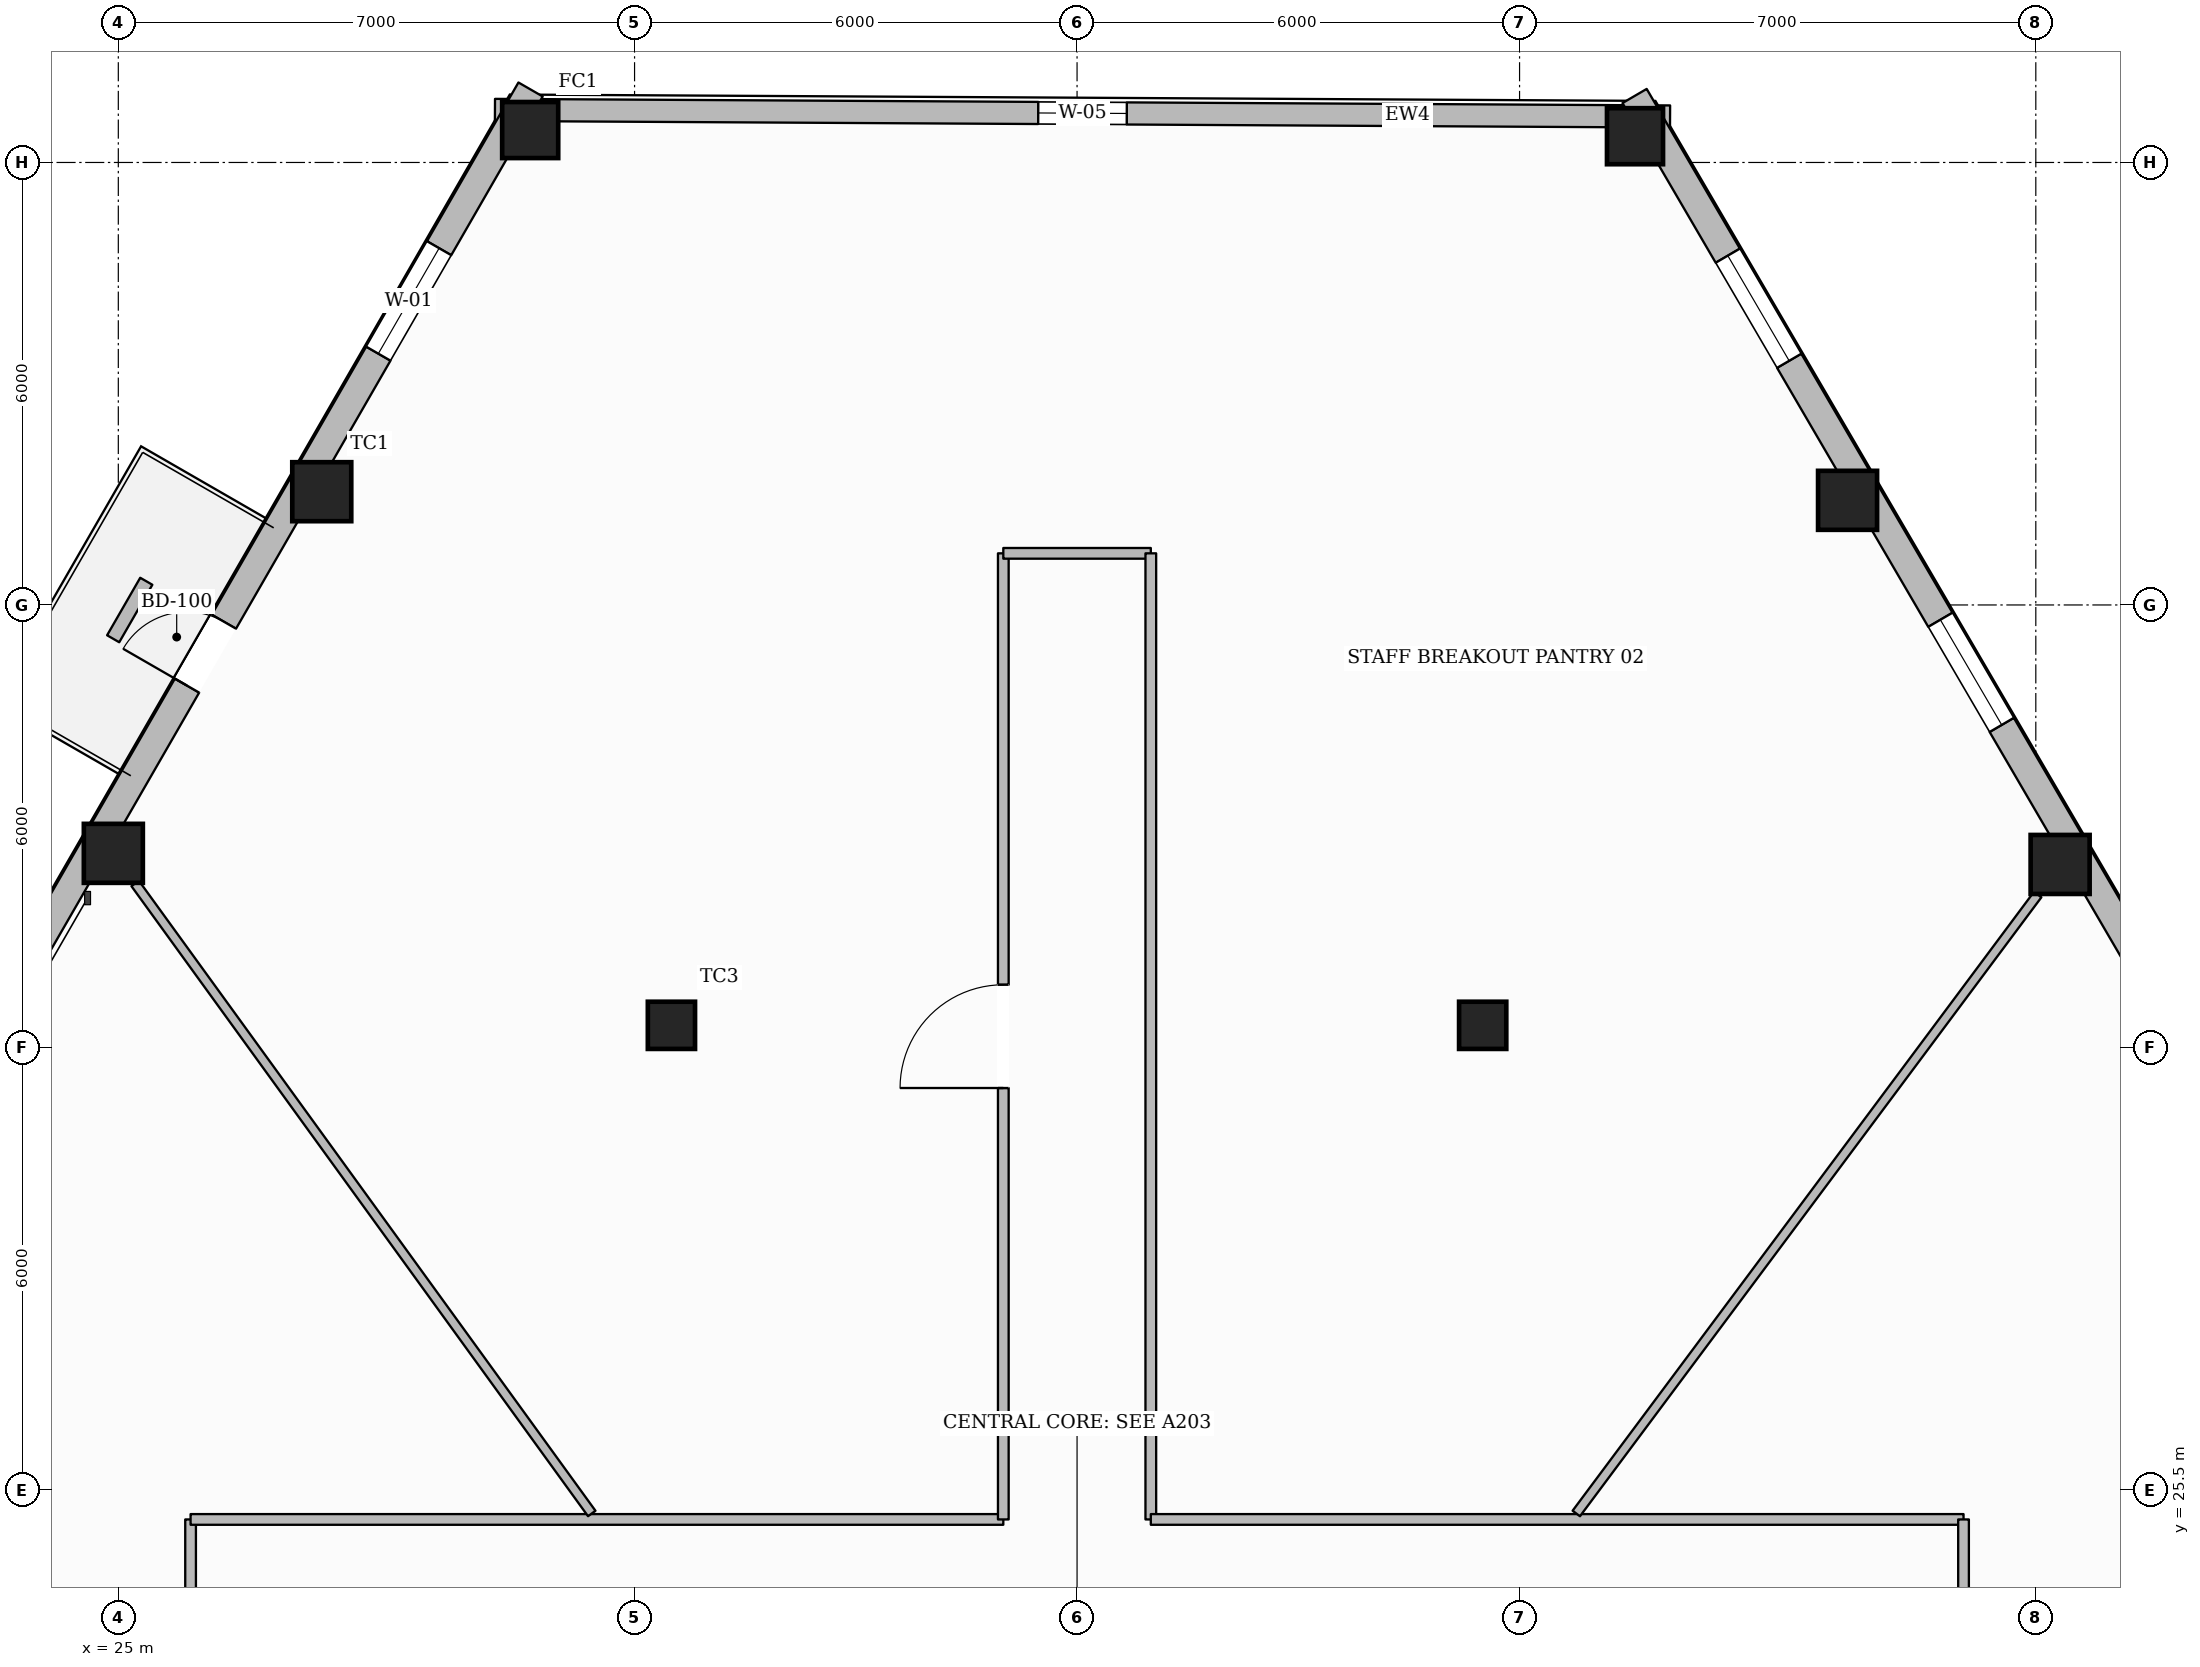
"""IFC4 building model, lengths in metres.
Left out: names, types, materials, properties, quantities, classifications, styles, units other than length and angle.
Written with IfcOpenShell. Run it as: python <this file> out.ifc"""

import sys

from ifc_helpers import new_model, si_unit, direction, frame, frame_2d, origin, origin_2d, place, context, subcontext, project, spatial, rectangle, hollow_rectangle, extrude, element, fill, save


model = new_model("IFC4")
c1 = context("Model", 3, precision=1e-05, world=origin(), true_north=direction((0.0, 1.0)))
c2 = subcontext(c1, "Body", "Model", "MODEL_VIEW")
j1 = project(units=[si_unit("LENGTHUNIT", "METRE"), si_unit("PLANEANGLEUNIT", "RADIAN")], contexts=[c1])
p1 = place(None, origin())
s1 = spatial("IfcSite", under=j1, at=p1, CompositionType="ELEMENT")
p2 = place(p1, origin())
s2 = spatial("IfcBuilding", under=s1, at=p2, CompositionType="ELEMENT")
p3 = place(p2, frame((0.0, 0.0, 48.35)))
s3 = spatial("IfcBuildingStorey", under=s2, at=p3, CompositionType="ELEMENT", Elevation=48.35)
p4 = place(p3, frame((30.585, 43.94, 0.0), z_axis=(0.0, 0.0, 1.0), x_axis=(1.0, 0.0, 0.0)))
e1 = element("IfcColumn", 1, at=p4, inside=s3, PredefinedType="COLUMN", context=c2, shape_type="SweptSolid", body=[
    extrude(hollow_rectangle(XDim=0.76, YDim=0.76, WallThickness=0.035, at=origin_2d()), origin(), (0.0, 0.0, 1.0), 3.59),
])
for number, where, z_axis, x_axis in (
    (2, (27.759, 39.036, 0.0), (0.0, 0.0, 1.0), (1.0, 0.0, 0.0)),
    (3, (24.933, 34.132, 0.0), (0.0, 0.0, 1.0), (1.0, 0.0, 0.0)),
    (4, (51.33, 33.981, 0.0), (0.0, 0.0, 1.0), (1.0, 0.0, 0.0)),
    (5, (48.448, 38.919, 0.0), (0.0, 0.0, 1.0), (1.0, 0.0, 0.0)),
):
    element("IfcColumn", number, at=place(p3, frame(where, z_axis=z_axis, x_axis=x_axis)), inside=s3, PredefinedType="COLUMN", context=c2, shape_type="SweptSolid", body=[
        extrude(hollow_rectangle(XDim=0.8, YDim=0.8, WallThickness=0.036, at=origin_2d()), origin(), (0.0, 0.0, 1.0), 3.59),
    ])
p5 = place(p3, frame((45.565, 43.856, 0.0), z_axis=(0.0, 0.0, 1.0), x_axis=(1.0, 0.0, 0.0)))
e6 = element("IfcColumn", 6, at=p5, inside=s3, PredefinedType="COLUMN", context=c2, shape_type="SweptSolid", body=[
    extrude(hollow_rectangle(XDim=0.76, YDim=0.76, WallThickness=0.035, at=origin_2d()), origin(), (0.0, 0.0, 1.0), 3.59),
])
for number, where, z_axis, x_axis in (
    (7, (32.5, 31.8, 0.0), (0.0, 0.0, 1.0), (1.0, 0.0, 0.0)),
    (8, (43.5, 31.8, 0.0), (0.0, 0.0, 1.0), (1.0, 0.0, 0.0)),
):
    element("IfcColumn", number, at=place(p3, frame(where, z_axis=z_axis, x_axis=x_axis)), inside=s3, PredefinedType="COLUMN", context=c2, shape_type="SweptSolid", body=[
        extrude(hollow_rectangle(XDim=0.64, YDim=0.64, WallThickness=0.028, at=origin_2d()), origin(), (0.0, 0.0, 1.0), 3.59),
    ])
p6 = place(p3, frame((30.107, 44.212, 0.0), z_axis=(0.0, 0.0, 1.0), x_axis=(0.999984446961, -0.005577260644, 0.0)))
e9 = element("IfcWall", 9, at=p6, inside=s3, PredefinedType="STANDARD", context=c2, shape_type="SweptSolid", body=[
    extrude(rectangle(XDim=15.934, YDim=0.3, at=frame_2d((7.967, 0.0))), origin(), (0.0, 0.0, 1.0), 2.97),
])
p7 = place(p6, frame((7.367, 0.0, 0.65)))
e10 = element("IfcOpeningElement", 10, at=p7, cuts=e9, PredefinedType="OPENING", context=c2, shape_type="SweptSolid", body=[
    extrude(rectangle(XDim=1.2, YDim=1.7, at=frame_2d((0.6, 0.85))), frame((0.0, 0.16, 0.0), z_axis=(0.0, -1.0, 0.0), x_axis=(1.0, 0.0, 0.0)), (0.0, 0.0, 1.0), 0.32),
])
p8 = place(p3, frame((13.156, 14.237, 0.0), z_axis=(0.0, 0.0, 1.0), x_axis=(0.499310189151, 0.866423300131, 0.0)))
e11 = element("IfcWall", 11, at=p8, inside=s3, PredefinedType="STANDARD", context=c2, shape_type="SweptSolid", body=[
    extrude(rectangle(XDim=34.917, YDim=0.38, at=frame_2d((17.458, 0.0))), origin(), (0.0, 0.0, 1.0), 2.97),
])
p9 = place(p8, frame((25.588, 0.0, 0.0)))
e12 = element("IfcOpeningElement", 12, at=p9, cuts=e11, PredefinedType="OPENING", context=c2, shape_type="SweptSolid", body=[
    extrude(rectangle(XDim=1.0, YDim=2.2, at=frame_2d((0.5, 1.1))), frame((0.0, 0.2, 0.0), z_axis=(0.0, -1.0, 0.0), x_axis=(1.0, 0.0, 0.0)), (0.0, 0.0, 1.0), 0.4),
])
p10 = place(p8, frame((30.783, 0.0, 0.65)))
e13 = element("IfcOpeningElement", 13, at=p10, cuts=e11, PredefinedType="OPENING", context=c2, shape_type="SweptSolid", body=[
    extrude(rectangle(XDim=1.65, YDim=1.75, at=frame_2d((0.825, 0.875))), frame((0.0, 0.2, 0.0), z_axis=(0.0, -1.0, 0.0), x_axis=(1.0, 0.0, 0.0)), (0.0, 0.0, 1.0), 0.4),
])
p11 = place(p8, frame((8.143, 0.0, 0.65)))
e14 = element("IfcOpeningElement", 14, at=p11, cuts=e11, PredefinedType="OPENING", context=c2, shape_type="SweptSolid", body=[
    extrude(rectangle(XDim=1.65, YDim=1.75, at=frame_2d((0.825, 0.875))), frame((0.0, 0.2, 0.0), z_axis=(0.0, -1.0, 0.0), x_axis=(1.0, 0.0, 0.0)), (0.0, 0.0, 1.0), 0.4),
])
p12 = place(p8, frame((2.483, 0.0, 0.65)))
e15 = element("IfcOpeningElement", 15, at=p12, cuts=e11, PredefinedType="OPENING", context=c2, shape_type="SweptSolid", body=[
    extrude(rectangle(XDim=1.65, YDim=1.75, at=frame_2d((0.825, 0.875))), frame((0.0, 0.2, 0.0), z_axis=(0.0, -1.0, 0.0), x_axis=(1.0, 0.0, 0.0)), (0.0, 0.0, 1.0), 0.4),
])
p13 = place(p3, frame((45.56, 44.402, 0.0), z_axis=(0.0, 0.0, 1.0), x_axis=(0.504140111044, -0.86362187816, 0.0)))
e16 = element("IfcWall", 16, at=p13, inside=s3, PredefinedType="STANDARD", context=c2, shape_type="SweptSolid", body=[
    extrude(rectangle(XDim=35.254, YDim=0.38, at=frame_2d((17.627, 0.0))), origin(), (0.0, 0.0, 1.0), 2.97),
])
p14 = place(p13, frame((31.093, 0.0, 0.65)))
e17 = element("IfcOpeningElement", 17, at=p14, cuts=e16, PredefinedType="OPENING", context=c2, shape_type="SweptSolid", body=[
    extrude(rectangle(XDim=1.65, YDim=1.75, at=frame_2d((0.825, 0.875))), frame((0.0, 0.2, 0.0), z_axis=(0.0, -1.0, 0.0), x_axis=(1.0, 0.0, 0.0)), (0.0, 0.0, 1.0), 0.4),
])
p15 = place(p13, frame((25.375, 0.0, 0.65)))
e18 = element("IfcOpeningElement", 18, at=p15, cuts=e16, PredefinedType="OPENING", context=c2, shape_type="SweptSolid", body=[
    extrude(rectangle(XDim=1.65, YDim=1.75, at=frame_2d((0.825, 0.875))), frame((0.0, 0.2, 0.0), z_axis=(0.0, -1.0, 0.0), x_axis=(1.0, 0.0, 0.0)), (0.0, 0.0, 1.0), 0.4),
])
p16 = place(p13, frame((19.658, 0.0, 0.65)))
e19 = element("IfcOpeningElement", 19, at=p16, cuts=e16, PredefinedType="OPENING", context=c2, shape_type="SweptSolid", body=[
    extrude(rectangle(XDim=1.65, YDim=1.75, at=frame_2d((0.825, 0.875))), frame((0.0, 0.2, 0.0), z_axis=(0.0, -1.0, 0.0), x_axis=(1.0, 0.0, 0.0)), (0.0, 0.0, 1.0), 0.4),
])
p17 = place(p13, frame((8.224, 0.0, 0.65)))
e20 = element("IfcOpeningElement", 20, at=p17, cuts=e16, PredefinedType="OPENING", context=c2, shape_type="SweptSolid", body=[
    extrude(rectangle(XDim=1.65, YDim=1.75, at=frame_2d((0.825, 0.875))), frame((0.0, 0.2, 0.0), z_axis=(0.0, -1.0, 0.0), x_axis=(1.0, 0.0, 0.0)), (0.0, 0.0, 1.0), 0.4),
])
p18 = place(p13, frame((2.507, 0.0, 0.65)))
e21 = element("IfcOpeningElement", 21, at=p18, cuts=e16, PredefinedType="OPENING", context=c2, shape_type="SweptSolid", body=[
    extrude(rectangle(XDim=1.65, YDim=1.75, at=frame_2d((0.825, 0.875))), frame((0.0, 0.2, 0.0), z_axis=(0.0, -1.0, 0.0), x_axis=(1.0, 0.0, 0.0)), (0.0, 0.0, 1.0), 0.4),
])
p19 = place(p3, frame((25.379, 37.821, 0.0), z_axis=(0.0, 0.0, 1.0), x_axis=(-0.499174352876, -0.866501566895, 0.0)))
e22 = element("IfcWall", 22, at=p19, inside=s3, PredefinedType="USERDEFINED", context=c2, shape_type="SweptSolid", body=[
    extrude(rectangle(XDim=0.9, YDim=0.19, at=frame_2d((0.45, 0.0))), origin(), (0.0, 0.0, 1.0), 0.5),
])
p20 = place(p3, frame((25.98, 9.1, 0.0), z_axis=(0.0, 0.0, 1.0), x_axis=(0.0, 1.0, 0.0)))
e23 = element("IfcWall", 23, at=p20, inside=s3, PredefinedType="PARTITIONING", context=c2, shape_type="SweptSolid", body=[
    extrude(rectangle(XDim=16.0, YDim=0.145, at=frame_2d((8.0, 0.0))), origin(), (0.0, 0.0, 1.0), 3.278),
])
p21 = place(p20, frame((7.3, 0.0, 0.0)))
e24 = element("IfcOpeningElement", 24, at=p21, cuts=e23, PredefinedType="OPENING", context=c2, shape_type="SweptSolid", body=[
    extrude(rectangle(XDim=1.4, YDim=2.2, at=frame_2d((0.7, 1.1))), frame((0.0, 0.083, 0.0), z_axis=(0.0, -1.0, 0.0), x_axis=(1.0, 0.0, 0.0)), (0.0, 0.0, 1.0), 0.165),
])
p22 = place(p3, frame((25.98, 25.1, 0.0), z_axis=(0.0, 0.0, 1.0), x_axis=(1.0, 0.0, 0.0)))
e25 = element("IfcWall", 25, at=p22, inside=s3, PredefinedType="PARTITIONING", context=c2, shape_type="SweptSolid", body=[
    extrude(rectangle(XDim=11.02, YDim=0.145, at=frame_2d((5.51, 0.0))), origin(), (0.0, 0.0, 1.0), 3.59),
])
p23 = place(p3, frame((37.0, 25.1, 0.0), z_axis=(0.0, 0.0, 1.0), x_axis=(0.0, 1.0, 0.0)))
e26 = element("IfcWall", 26, at=p23, inside=s3, PredefinedType="PARTITIONING", context=c2, shape_type="SweptSolid", body=[
    extrude(rectangle(XDim=13.1, YDim=0.145, at=frame_2d((6.55, 0.0))), origin(), (0.0, 0.0, 1.0), 3.59),
])
p24 = place(p23, frame((5.85, 0.0, 0.0)))
e27 = element("IfcOpeningElement", 27, at=p24, cuts=e26, PredefinedType="OPENING", context=c2, shape_type="SweptSolid", body=[
    extrude(rectangle(XDim=1.4, YDim=2.2, at=frame_2d((0.7, 1.1))), frame((0.0, 0.083, 0.0), z_axis=(0.0, -1.0, 0.0), x_axis=(1.0, 0.0, 0.0)), (0.0, 0.0, 1.0), 0.165),
])
p25 = place(p3, frame((37.0, 38.2, 0.0), z_axis=(0.0, 0.0, 1.0), x_axis=(1.0, 0.0, 0.0)))
e28 = element("IfcWall", 28, at=p25, inside=s3, PredefinedType="PARTITIONING", context=c2, shape_type="SweptSolid", body=[
    extrude(rectangle(XDim=2.0, YDim=0.145, at=frame_2d((1.0, 0.0))), origin(), (0.0, 0.0, 1.0), 3.59),
])
p26 = place(p3, frame((39.0, 38.2, 0.0), z_axis=(0.0, 0.0, 1.0), x_axis=(0.0, -1.0, 0.0)))
e29 = element("IfcWall", 29, at=p26, inside=s3, PredefinedType="PARTITIONING", context=c2, shape_type="SweptSolid", body=[
    extrude(rectangle(XDim=13.1, YDim=0.145, at=frame_2d((6.55, 0.0))), origin(), (0.0, 0.0, 1.0), 3.59),
])
p27 = place(p3, frame((39.0, 25.1, 0.0), z_axis=(0.0, 0.0, 1.0), x_axis=(1.0, 0.0, 0.0)))
e30 = element("IfcWall", 30, at=p27, inside=s3, PredefinedType="PARTITIONING", context=c2, shape_type="SweptSolid", body=[
    extrude(rectangle(XDim=11.02, YDim=0.145, at=frame_2d((5.51, 0.0))), origin(), (0.0, 0.0, 1.0), 3.59),
])
p28 = place(p3, frame((50.02, 25.1, 0.0), z_axis=(0.0, 0.0, 1.0), x_axis=(0.0, -1.0, 0.0)))
e31 = element("IfcWall", 31, at=p28, inside=s3, PredefinedType="PARTITIONING", context=c2, shape_type="SweptSolid", body=[
    extrude(rectangle(XDim=16.0, YDim=0.145, at=frame_2d((8.0, 0.0))), origin(), (0.0, 0.0, 1.0), 3.278),
])
p29 = place(p28, frame((3.04, 0.0, 0.0)))
e32 = element("IfcOpeningElement", 32, at=p29, cuts=e31, PredefinedType="OPENING", context=c2, shape_type="SweptSolid", body=[
    extrude(rectangle(XDim=1.4, YDim=2.2, at=frame_2d((0.7, 1.1))), frame((0.0, 0.083, 0.0), z_axis=(0.0, -1.0, 0.0), x_axis=(1.0, 0.0, 0.0)), (0.0, 0.0, 1.0), 0.165),
])
p30 = place(p28, frame((10.869, 0.0, 0.0)))
e33 = element("IfcOpeningElement", 33, at=p30, cuts=e31, PredefinedType="OPENING", context=c2, shape_type="SweptSolid", body=[
    extrude(rectangle(XDim=1.4, YDim=2.2, at=frame_2d((0.7, 1.1))), frame((0.0, 0.083, 0.0), z_axis=(0.0, -1.0, 0.0), x_axis=(1.0, 0.0, 0.0)), (0.0, 0.0, 1.0), 0.165),
])
p31 = place(p3, frame((44.769, 25.18, 0.0), z_axis=(0.0, 0.0, 1.0), x_axis=(0.597661555118, 0.801748505165, 0.0)))
e34 = element("IfcWall", 34, at=p31, inside=s3, PredefinedType="PARTITIONING", context=c2, shape_type="SweptSolid", body=[
    extrude(rectangle(XDim=10.469, YDim=0.125, at=frame_2d((5.234, 0.0))), origin(), (0.0, 0.0, 1.0), 3.057),
])
p32 = place(p3, frame((31.42, 25.18, 0.0), z_axis=(0.0, 0.0, 1.0), x_axis=(-0.586790860412, 0.809738529487, 0.0)))
e35 = element("IfcWall", 35, at=p32, inside=s3, PredefinedType="PARTITIONING", context=c2, shape_type="SweptSolid", body=[
    extrude(rectangle(XDim=10.551, YDim=0.125, at=frame_2d((5.275, 0.0))), origin(), (0.0, 0.0, 1.0), 3.057),
])
p33 = place(p9, origin())
e36 = element("IfcDoor", 36, at=p33, inside=s3, OperationType="SINGLE_SWING_LEFT", PredefinedType="DOOR", context=c2, shape_type="SweptSolid", body=[
    extrude(rectangle(XDim=1.0, YDim=2.2, at=frame_2d((0.5, 1.1))), frame((0.0, 0.025, 0.0), z_axis=(0.0, -1.0, 0.0), x_axis=(1.0, 0.0, 0.0)), (0.0, 0.0, 1.0), 0.05),
])
fill(e12, e36)
p34 = place(p10, origin())
e37 = element("IfcWindow", 37, at=p34, inside=s3, PartitioningType="SINGLE_PANEL", PredefinedType="WINDOW", context=c2, shape_type="SweptSolid", body=[
    extrude(rectangle(XDim=1.65, YDim=1.75, at=frame_2d((0.825, 0.875))), frame((0.0, 0.03, 0.0), z_axis=(0.0, -1.0, 0.0), x_axis=(1.0, 0.0, 0.0)), (0.0, 0.0, 1.0), 0.06),
])
fill(e13, e37)
p35 = place(p17, origin())
e38 = element("IfcWindow", 38, at=p35, inside=s3, PartitioningType="SINGLE_PANEL", PredefinedType="WINDOW", context=c2, shape_type="SweptSolid", body=[
    extrude(rectangle(XDim=1.65, YDim=1.75, at=frame_2d((0.825, 0.875))), frame((0.0, 0.03, 0.0), z_axis=(0.0, -1.0, 0.0), x_axis=(1.0, 0.0, 0.0)), (0.0, 0.0, 1.0), 0.06),
])
fill(e20, e38)
p36 = place(p18, origin())
e39 = element("IfcWindow", 39, at=p36, inside=s3, PartitioningType="SINGLE_PANEL", PredefinedType="WINDOW", context=c2, shape_type="SweptSolid", body=[
    extrude(rectangle(XDim=1.65, YDim=1.75, at=frame_2d((0.825, 0.875))), frame((0.0, 0.03, 0.0), z_axis=(0.0, -1.0, 0.0), x_axis=(1.0, 0.0, 0.0)), (0.0, 0.0, 1.0), 0.06),
])
fill(e21, e39)
p37 = place(p7, origin())
e40 = element("IfcWindow", 40, at=p37, inside=s3, PartitioningType="SINGLE_PANEL", PredefinedType="WINDOW", context=c2, shape_type="SweptSolid", body=[
    extrude(rectangle(XDim=1.2, YDim=1.7, at=frame_2d((0.6, 0.85))), frame((0.0, 0.03, 0.0), z_axis=(0.0, -1.0, 0.0), x_axis=(1.0, 0.0, 0.0)), (0.0, 0.0, 1.0), 0.06),
])
fill(e10, e40)
p38 = place(p24, origin())
e41 = element("IfcDoor", 41, at=p38, inside=s3, OperationType="SINGLE_SWING_LEFT", PredefinedType="DOOR", context=c2, shape_type="SweptSolid", body=[
    extrude(rectangle(XDim=1.4, YDim=2.2, at=frame_2d((0.7, 1.1))), frame((0.0, 0.025, 0.0), z_axis=(0.0, -1.0, 0.0), x_axis=(1.0, 0.0, 0.0)), (0.0, 0.0, 1.0), 0.05),
])
fill(e27, e41)
save(model, sys.argv[1])
